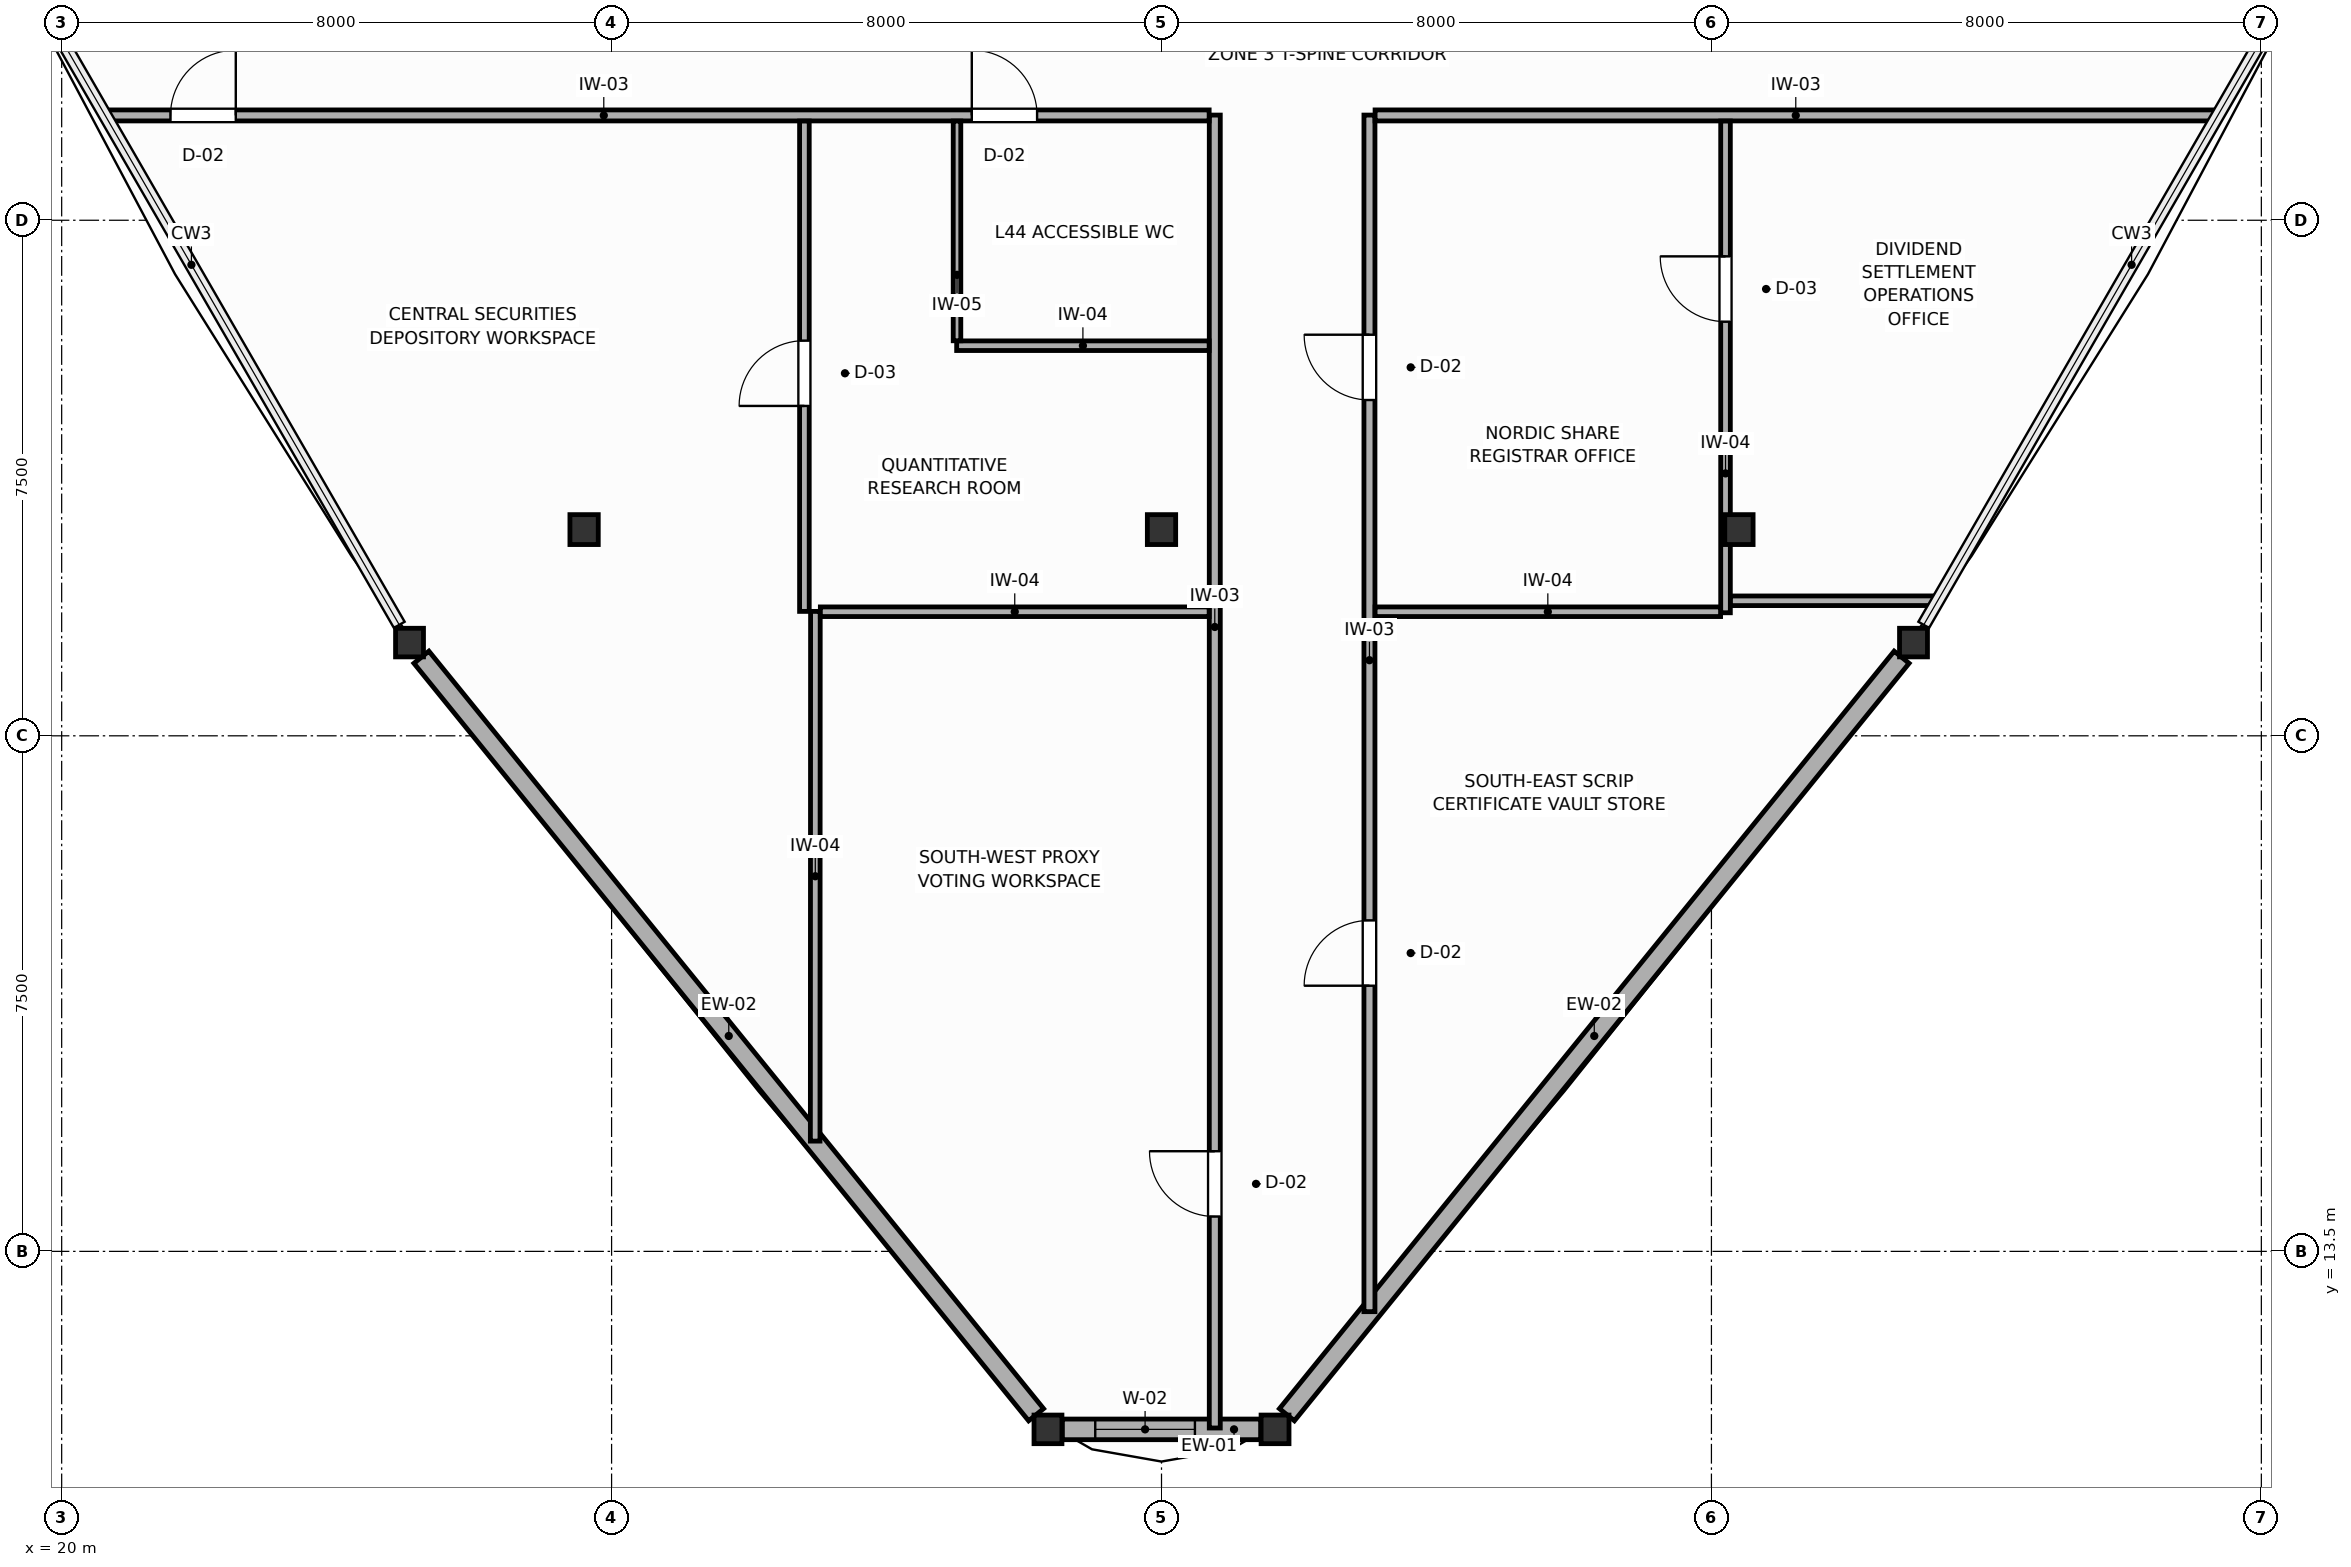
"""IFC4 building model, lengths in metres.
Left out: names, types, materials, properties, quantities, classifications, styles, units other than length and angle.
Written with IfcOpenShell. Run it as: python <this file> out.ifc"""

import sys

from ifc_helpers import new_model, si_unit, direction, frame, frame_2d, origin, origin_2d, place, context, subcontext, project, spatial, rectangle, i_section, extrude, source, transform, mapped, element, fill, save


model = new_model("IFC4")
c1 = context("Model", 3, precision=1e-05, world=origin(), true_north=direction((0.0, 1.0)))
c2 = subcontext(c1, "Body", "Model", "MODEL_VIEW")
j1 = project(units=[si_unit("LENGTHUNIT", "METRE"), si_unit("PLANEANGLEUNIT", "RADIAN")], contexts=[c1])
p1 = place(None, origin())
s1 = spatial("IfcSite", under=j1, at=p1, CompositionType="ELEMENT")
p2 = place(p1, origin())
s2 = spatial("IfcBuilding", under=s1, at=p2, CompositionType="ELEMENT")
p3 = place(p2, frame((0.0, 0.0, 172.2)))
s3 = spatial("IfcBuildingStorey", under=s2, at=p3, CompositionType="ELEMENT", Elevation=172.2)
m1 = source(origin(), c2, "Body", "SweptSolid", [
    extrude(i_section(OverallWidth=0.412, OverallDepth=0.435, WebThickness=0.033, FlangeThickness=0.053, FilletRadius=0.015, at=origin_2d()), origin(), (0.0, 0.0, 1.0), 3.6),
])
for number, where, z_axis, x_axis in (
    (1, (27.6, 24.0, 0.0), (0.0, 0.0, 1.0), (1.0, 0.0, 0.0)),
    (2, (44.4, 24.0, 0.0), (0.0, 0.0, 1.0), (1.0, 0.0, 0.0)),
    (3, (36.0, 24.0, 0.0), (0.0, 0.0, 1.0), (1.0, 0.0, 0.0)),
):
    element("IfcColumn", number, at=place(p3, frame(where, z_axis=z_axis, x_axis=x_axis)), inside=s3, PredefinedType="COLUMN", context=c2, shape_type="MappedRepresentation", body=[
        mapped(m1, transform((0.0, 0.0, 0.0), scale=1.0)),
    ])
m2 = source(origin(), c2, "Body", "SweptSolid", [
    extrude(i_section(OverallWidth=0.406, OverallDepth=0.416, WebThickness=0.027, FlangeThickness=0.044, FilletRadius=0.015, at=origin_2d()), origin(), (0.0, 0.0, 1.0), 3.6),
])
for number, where, z_axis, x_axis in (
    (4, (25.06, 22.356, 0.0), (0.0, 0.0, 1.0), (1.0, 0.0, 0.0)),
    (5, (34.348, 10.911, 0.0), (0.0, 0.0, 1.0), (1.0, 0.0, 0.0)),
    (6, (37.652, 10.911, 0.0), (0.0, 0.0, 1.0), (1.0, 0.0, 0.0)),
    (7, (46.94, 22.356, 0.0), (0.0, 0.0, 1.0), (1.0, 0.0, 0.0)),
):
    element("IfcColumn", number, at=place(p3, frame(where, z_axis=z_axis, x_axis=x_axis)), inside=s3, PredefinedType="COLUMN", context=c2, shape_type="MappedRepresentation", body=[
        mapped(m2, transform((0.0, 0.0, 0.0), scale=1.0)),
    ])
p4 = place(p3, frame((25.233, 22.143, 0.0), z_axis=(0.0, 0.0, 1.0), x_axis=(0.63011778054, -0.776499570281, 0.0)))
e8 = element("IfcWall", 8, at=p4, inside=s3, PredefinedType="SOLIDWALL", context=c2, shape_type="SweptSolid", body=[
    extrude(rectangle(XDim=14.192, YDim=0.28, at=frame_2d((7.096, 0.0))), origin(), (0.0, 0.0, 1.0), 3.01),
])
p5 = place(p3, frame((34.556, 10.911, 0.0), z_axis=(0.0, 0.0, 1.0), x_axis=(1.0, 0.0, 0.0)))
e9 = element("IfcWall", 9, at=p5, inside=s3, PredefinedType="SOLIDWALL", context=c2, shape_type="SweptSolid", body=[
    extrude(rectangle(XDim=2.887, YDim=0.3, at=frame_2d((1.444, 0.0))), origin(), (0.0, 0.0, 1.0), 3.01),
])
p6 = place(p5, frame((0.48, 0.0, 0.75)))
e10 = element("IfcOpeningElement", 10, at=p6, cuts=e9, PredefinedType="OPENING", context=c2, shape_type="SweptSolid", body=[
    extrude(rectangle(XDim=1.45, YDim=1.65, at=frame_2d((0.725, 0.825))), frame((0.0, 0.16, 0.0), z_axis=(0.0, -1.0, 0.0), x_axis=(1.0, 0.0, 0.0)), (0.0, 0.0, 1.0), 0.32),
])
p7 = place(p3, frame((37.824, 11.124, 0.0), z_axis=(0.0, 0.0, 1.0), x_axis=(0.63011778054, 0.776499570281, 0.0)))
e11 = element("IfcWall", 11, at=p7, inside=s3, PredefinedType="SOLIDWALL", context=c2, shape_type="SweptSolid", body=[
    extrude(rectangle(XDim=14.192, YDim=0.28, at=frame_2d((7.096, 0.0))), origin(), (0.0, 0.0, 1.0), 3.01),
])
p8 = place(p3, frame((36.775, 10.931, 0.0), z_axis=(0.0, 0.0, 1.0), x_axis=(0.0, 1.0, 0.0)))
e12 = element("IfcWall", 12, at=p8, inside=s3, PredefinedType="PARTITIONING", context=c2, shape_type="SweptSolid", body=[
    extrude(rectangle(XDim=19.099, YDim=0.16, at=frame_2d((9.55, 0.0))), origin(), (0.0, 0.0, 1.0), 2.95),
])
p9 = place(p8, frame((3.076, 0.0, 0.0)))
e13 = element("IfcOpeningElement", 13, at=p9, cuts=e12, PredefinedType="OPENING", context=c2, shape_type="SweptSolid", body=[
    extrude(rectangle(XDim=0.95, YDim=2.05, at=frame_2d((0.475, 1.025))), frame((0.0, 0.09, 0.0), z_axis=(0.0, -1.0, 0.0), x_axis=(1.0, 0.0, 0.0)), (0.0, 0.0, 1.0), 0.18),
])
p10 = place(p3, frame((39.025, 12.623, 0.0), z_axis=(0.0, 0.0, 1.0), x_axis=(0.0, 1.0, 0.0)))
e14 = element("IfcWall", 14, at=p10, inside=s3, PredefinedType="PARTITIONING", context=c2, shape_type="SweptSolid", body=[
    extrude(rectangle(XDim=17.407, YDim=0.16, at=frame_2d((8.704, 0.0))), origin(), (0.0, 0.0, 1.0), 3.4),
])
p11 = place(p10, frame((4.742, 0.0, 0.0)))
e15 = element("IfcOpeningElement", 15, at=p11, cuts=e14, PredefinedType="OPENING", context=c2, shape_type="SweptSolid", body=[
    extrude(rectangle(XDim=0.95, YDim=2.05, at=frame_2d((0.475, 1.025))), frame((0.0, 0.09, 0.0), z_axis=(0.0, -1.0, 0.0), x_axis=(1.0, 0.0, 0.0)), (0.0, 0.0, 1.0), 0.18),
])
p12 = place(p10, frame((13.262, 0.0, 0.0)))
e16 = element("IfcOpeningElement", 16, at=p12, cuts=e14, PredefinedType="OPENING", context=c2, shape_type="SweptSolid", body=[
    extrude(rectangle(XDim=0.95, YDim=2.05, at=frame_2d((0.475, 1.025))), frame((0.0, 0.09, 0.0), z_axis=(0.0, -1.0, 0.0), x_axis=(1.0, 0.0, 0.0)), (0.0, 0.0, 1.0), 0.18),
])
p13 = place(p3, frame((20.653, 30.025, 0.0), z_axis=(0.0, 0.0, 1.0), x_axis=(1.0, 0.0, 0.0)))
e17 = element("IfcWall", 17, at=p13, inside=s3, PredefinedType="PARTITIONING", context=c2, shape_type="SweptSolid", body=[
    extrude(rectangle(XDim=16.04, YDim=0.16, at=frame_2d((8.02, 0.0))), origin(), (0.0, 0.0, 1.0), 3.4),
])
p14 = place(p13, frame((12.587, 0.0, 0.0)))
e18 = element("IfcOpeningElement", 18, at=p14, cuts=e17, PredefinedType="OPENING", context=c2, shape_type="SweptSolid", body=[
    extrude(rectangle(XDim=0.95, YDim=2.05, at=frame_2d((0.475, 1.025))), frame((0.0, 0.09, 0.0), z_axis=(0.0, -1.0, 0.0), x_axis=(1.0, 0.0, 0.0)), (0.0, 0.0, 1.0), 0.18),
])
p15 = place(p13, frame((0.93, 0.0, 0.0)))
e19 = element("IfcOpeningElement", 19, at=p15, cuts=e17, PredefinedType="OPENING", context=c2, shape_type="SweptSolid", body=[
    extrude(rectangle(XDim=0.95, YDim=2.05, at=frame_2d((0.475, 1.025))), frame((0.0, 0.09, 0.0), z_axis=(0.0, -1.0, 0.0), x_axis=(1.0, 0.0, 0.0)), (0.0, 0.0, 1.0), 0.18),
])
p16 = place(p3, frame((39.107, 30.025, 0.0), z_axis=(0.0, 0.0, 1.0), x_axis=(1.0, 0.0, 0.0)))
e20 = element("IfcWall", 20, at=p16, inside=s3, PredefinedType="PARTITIONING", context=c2, shape_type="SweptSolid", body=[
    extrude(rectangle(XDim=12.24, YDim=0.16, at=frame_2d((6.12, 0.0))), origin(), (0.0, 0.0, 1.0), 3.4),
])
p17 = place(p3, frame((30.962, 15.104, 0.0), z_axis=(0.0, 0.0, 1.0), x_axis=(0.000443543234, 0.999999901635, 0.0)))
e21 = element("IfcWall", 21, at=p17, inside=s3, PredefinedType="PARTITIONING", context=c2, shape_type="SweptSolid", body=[
    extrude(rectangle(XDim=7.706, YDim=0.14, at=frame_2d((3.853, 0.0))), origin(), (0.0, 0.0, 1.0), 3.4),
])
p18 = place(p3, frame((44.205, 22.79, 0.0), z_axis=(0.0, 0.0, 1.0), x_axis=(0.0, 1.0, 0.0)))
e22 = element("IfcWall", 22, at=p18, inside=s3, PredefinedType="PARTITIONING", context=c2, shape_type="SweptSolid", body=[
    extrude(rectangle(XDim=7.153, YDim=0.14, at=frame_2d((3.577, 0.0))), origin(), (0.0, 0.0, 1.0), 2.95),
])
p19 = place(p18, frame((4.235, 0.0, 0.0)))
e23 = element("IfcOpeningElement", 23, at=p19, cuts=e22, PredefinedType="OPENING", context=c2, shape_type="SweptSolid", body=[
    extrude(rectangle(XDim=0.95, YDim=2.05, at=frame_2d((0.475, 1.025))), frame((0.0, 0.08, 0.0), z_axis=(0.0, -1.0, 0.0), x_axis=(1.0, 0.0, 0.0)), (0.0, 0.0, 1.0), 0.16),
])
p20 = place(p3, frame((30.805, 22.81, 0.0), z_axis=(0.0, 0.0, 1.0), x_axis=(0.0, 1.0, 0.0)))
e24 = element("IfcWall", 24, at=p20, inside=s3, PredefinedType="PARTITIONING", context=c2, shape_type="SweptSolid", body=[
    extrude(rectangle(XDim=7.133, YDim=0.14, at=frame_2d((3.566, 0.0))), origin(), (0.0, 0.0, 1.0), 3.4),
])
p21 = place(p20, frame((2.989, 0.0, 0.0)))
e25 = element("IfcOpeningElement", 25, at=p21, cuts=e24, PredefinedType="OPENING", context=c2, shape_type="SweptSolid", body=[
    extrude(rectangle(XDim=0.95, YDim=2.05, at=frame_2d((0.475, 1.025))), frame((0.0, 0.08, 0.0), z_axis=(0.0, -1.0, 0.0), x_axis=(1.0, 0.0, 0.0)), (0.0, 0.0, 1.0), 0.16),
])
p22 = place(p3, frame((31.037, 22.805, 0.0), z_axis=(0.0, 0.0, 1.0), x_axis=(1.0, 0.0, 0.0)))
e26 = element("IfcWall", 26, at=p22, inside=s3, PredefinedType="PARTITIONING", context=c2, shape_type="SweptSolid", body=[
    extrude(rectangle(XDim=5.656, YDim=0.14, at=frame_2d((2.828, 0.0))), origin(), (0.0, 0.0, 1.0), 3.4),
])
p23 = place(p3, frame((39.107, 22.805, 0.0), z_axis=(0.0, 0.0, 1.0), x_axis=(1.0, 0.0, 0.0)))
e27 = element("IfcWall", 27, at=p23, inside=s3, PredefinedType="PARTITIONING", context=c2, shape_type="SweptSolid", body=[
    extrude(rectangle(XDim=5.026, YDim=0.14, at=frame_2d((2.513, 0.0))), origin(), (0.0, 0.0, 1.0), 3.4),
])
p24 = place(p3, frame((33.02, 26.675, 0.0), z_axis=(0.0, 0.0, 1.0), x_axis=(1.0, 0.0, 0.0)))
e28 = element("IfcWall", 28, at=p24, inside=s3, PredefinedType="PARTITIONING", context=c2, shape_type="SweptSolid", body=[
    extrude(rectangle(XDim=3.673, YDim=0.14, at=frame_2d((1.836, 0.0))), origin(), (0.0, 0.0, 1.0), 3.4),
])
p25 = place(p3, frame((33.025, 26.747, 0.0), z_axis=(0.0, 0.0, 1.0), x_axis=(0.0, 1.0, 0.0)))
e29 = element("IfcWall", 29, at=p25, inside=s3, PredefinedType="MOVABLE", context=c2, shape_type="SweptSolid", body=[
    extrude(rectangle(XDim=3.196, YDim=0.11, at=frame_2d((1.598, 0.0))), origin(), (0.0, 0.0, 1.0), 3.4),
])
p26 = place(p3, frame((44.277, 22.964, 0.0), z_axis=(0.0, 0.0, 1.0), x_axis=(0.999999946802, 0.00032618444, 0.0)))
e30 = element("IfcWall", 30, at=p26, inside=s3, PredefinedType="PARTITIONING", context=c2, shape_type="SweptSolid", body=[
    extrude(rectangle(XDim=2.994, YDim=0.14, at=frame_2d((1.497, 0.0))), origin(), (0.0, 0.0, 1.0), 3.4),
])
p27 = place(p6, origin())
e31 = element("IfcWindow", 31, at=p27, inside=s3, PartitioningType="SINGLE_PANEL", PredefinedType="WINDOW", context=c2, shape_type="SweptSolid", body=[
    extrude(rectangle(XDim=1.45, YDim=1.65, at=frame_2d((0.725, 0.825))), frame((0.0, 0.03, 0.0), z_axis=(0.0, -1.0, 0.0), x_axis=(1.0, 0.0, 0.0)), (0.0, 0.0, 1.0), 0.06),
])
fill(e10, e31)
p28 = place(p9, origin())
e32 = element("IfcDoor", 32, at=p28, inside=s3, OperationType="SINGLE_SWING_RIGHT", PredefinedType="DOOR", context=c2, shape_type="SweptSolid", body=[
    extrude(rectangle(XDim=0.95, YDim=2.05, at=frame_2d((0.475, 1.025))), frame((0.0, 0.025, 0.0), z_axis=(0.0, -1.0, 0.0), x_axis=(1.0, 0.0, 0.0)), (0.0, 0.0, 1.0), 0.05),
])
fill(e13, e32)
p29 = place(p11, origin())
e33 = element("IfcDoor", 33, at=p29, inside=s3, OperationType="SINGLE_SWING_LEFT", PredefinedType="DOOR", context=c2, shape_type="SweptSolid", body=[
    extrude(rectangle(XDim=0.95, YDim=2.05, at=frame_2d((0.475, 1.025))), frame((0.0, 0.025, 0.0), z_axis=(0.0, -1.0, 0.0), x_axis=(1.0, 0.0, 0.0)), (0.0, 0.0, 1.0), 0.05),
])
fill(e15, e33)
p30 = place(p12, origin())
e34 = element("IfcDoor", 34, at=p30, inside=s3, OperationType="SINGLE_SWING_RIGHT", PredefinedType="DOOR", context=c2, shape_type="SweptSolid", body=[
    extrude(rectangle(XDim=0.95, YDim=2.05, at=frame_2d((0.475, 1.025))), frame((0.0, 0.025, 0.0), z_axis=(0.0, -1.0, 0.0), x_axis=(1.0, 0.0, 0.0)), (0.0, 0.0, 1.0), 0.05),
])
fill(e16, e34)
p31 = place(p14, origin())
e35 = element("IfcDoor", 35, at=p31, inside=s3, OperationType="SINGLE_SWING_LEFT", PredefinedType="DOOR", context=c2, shape_type="SweptSolid", body=[
    extrude(rectangle(XDim=0.95, YDim=2.05, at=frame_2d((0.475, 1.025))), frame((0.0, 0.025, 0.0), z_axis=(0.0, -1.0, 0.0), x_axis=(1.0, 0.0, 0.0)), (0.0, 0.0, 1.0), 0.05),
])
fill(e18, e35)
p32 = place(p15, origin())
e36 = element("IfcDoor", 36, at=p32, inside=s3, OperationType="SINGLE_SWING_RIGHT", PredefinedType="DOOR", context=c2, shape_type="SweptSolid", body=[
    extrude(rectangle(XDim=0.95, YDim=2.05, at=frame_2d((0.475, 1.025))), frame((0.0, 0.025, 0.0), z_axis=(0.0, -1.0, 0.0), x_axis=(1.0, 0.0, 0.0)), (0.0, 0.0, 1.0), 0.05),
])
fill(e19, e36)
p33 = place(p19, origin())
e37 = element("IfcDoor", 37, at=p33, inside=s3, OperationType="SINGLE_SWING_RIGHT", PredefinedType="DOOR", context=c2, shape_type="SweptSolid", body=[
    extrude(rectangle(XDim=0.95, YDim=2.05, at=frame_2d((0.475, 1.025))), frame((0.0, 0.025, 0.0), z_axis=(0.0, -1.0, 0.0), x_axis=(1.0, 0.0, 0.0)), (0.0, 0.0, 1.0), 0.05),
])
fill(e23, e37)
p34 = place(p21, origin())
e38 = element("IfcDoor", 38, at=p34, inside=s3, OperationType="SINGLE_SWING_LEFT", PredefinedType="DOOR", context=c2, shape_type="SweptSolid", body=[
    extrude(rectangle(XDim=0.95, YDim=2.05, at=frame_2d((0.475, 1.025))), frame((0.0, 0.025, 0.0), z_axis=(0.0, -1.0, 0.0), x_axis=(1.0, 0.0, 0.0)), (0.0, 0.0, 1.0), 0.05),
])
fill(e25, e38)
save(model, sys.argv[1])
